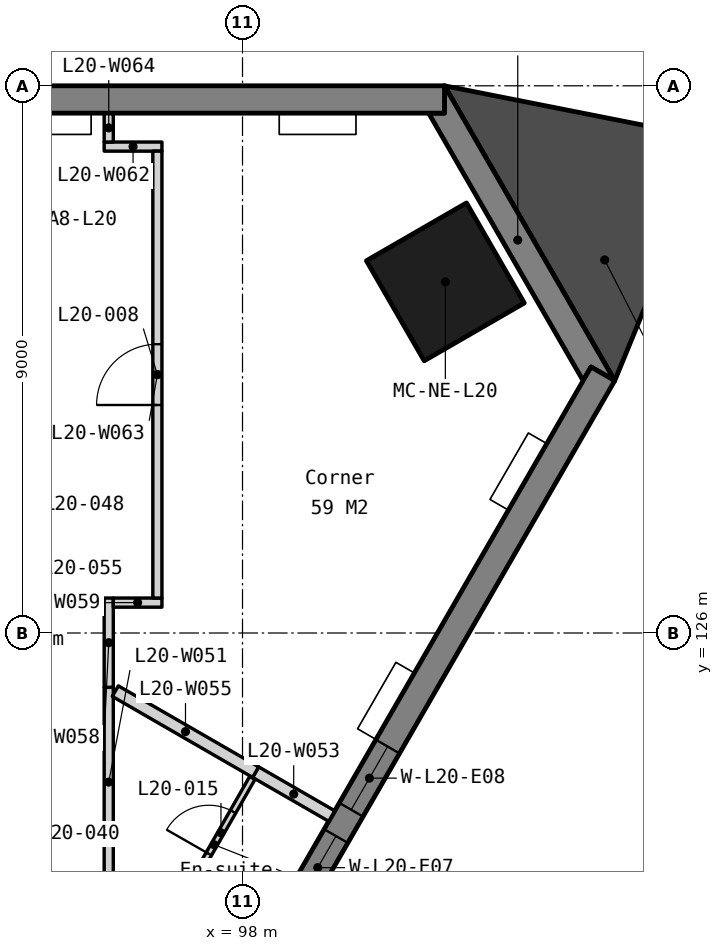
"""IFC4 building model, lengths in metres.
Left out: names, types, materials, properties, quantities, classifications, styles, units other than length and angle.
Written with IfcOpenShell. Run it as: python <this file> out.ifc"""

import sys

from ifc_helpers import new_model, si_unit, direction, frame, frame_2d, origin, origin_2d, place, context, subcontext, project, spatial, polyline, rectangle, outline, extrude, element, fill, save


model = new_model("IFC4")
c1 = context("Model", 3, precision=1e-05, world=origin(), true_north=direction((0.0, 1.0)))
c2 = subcontext(c1, "Body", "Model", "MODEL_VIEW")
j1 = project(units=[si_unit("LENGTHUNIT", "METRE"), si_unit("PLANEANGLEUNIT", "RADIAN")], contexts=[c1])
p1 = place(None, origin())
s1 = spatial("IfcSite", under=j1, at=p1, CompositionType="ELEMENT")
p2 = place(p1, origin())
s2 = spatial("IfcBuilding", under=s1, at=p2, CompositionType="ELEMENT")
p3 = place(p2, frame((0.0, 0.0, 85.3)))
s3 = spatial("IfcBuildingStorey", under=s2, at=p3, CompositionType="ELEMENT", Elevation=85.3)
p4 = place(p3, frame((101.336, 131.775, 0.0), z_axis=(0.0, 0.0, 1.0), x_axis=(-0.5, 0.866025403784, 0.0)))
e1 = element("IfcColumn", 1, at=p4, inside=s3, PredefinedType="COLUMN", context=c2, shape_type="SweptSolid", body=[
    extrude(rectangle(XDim=1.9, YDim=1.9, at=origin_2d()), origin(), (0.0, 0.0, 1.0), 3.5),
])
p5 = place(p3, frame((0.0, 0.0, -0.15)))
e2 = element("IfcWall", 2, at=p5, inside=s3, PredefinedType="SOLIDWALL", context=c2, shape_type="SweptSolid", body=[
    extrude(outline(polyline([(104.122, 130.15), (103.732, 130.375), (103.602, 130.15), (101.062, 134.55), (101.322, 134.55), (101.322, 135.0), (104.122, 130.15)])), origin(), (0.0, 0.0, 1.0), 3.5),
])
p6 = place(p3, frame((101.322, 134.775, -0.15), z_axis=(0.0, 0.0, 1.0), x_axis=(-1.0, 0.0, 0.0)))
e3 = element("IfcWall", 3, at=p6, inside=s3, PredefinedType="SOLIDWALL", context=c2, shape_type="SweptSolid", body=[
    extrude(outline(polyline([(42.643, 0.0), (42.643, 3.5), (0.0, 3.5), (0.0, 0.0), (42.643, 0.0)])), frame((0.0, 0.225, 0.0), z_axis=(0.0, -1.0, 0.0), x_axis=(1.0, 0.0, 0.0)), (0.0, 0.0, 1.0), 0.45),
])
p7 = place(p6, frame((7.079, 0.0, 1.05)))
e4 = element("IfcOpeningElement", 4, at=p7, cuts=e3, PredefinedType="OPENING", context=c2, shape_type="SweptSolid", body=[
    extrude(rectangle(XDim=1.2, YDim=1.5, at=frame_2d((0.6, 0.75))), frame((0.0, 0.235, 0.0), z_axis=(0.0, -1.0, 0.0), x_axis=(1.0, 0.0, 0.0)), (0.0, 0.0, 1.0), 0.47),
])
p8 = place(p6, frame((8.779, 0.0, 1.05)))
e5 = element("IfcOpeningElement", 5, at=p8, cuts=e3, PredefinedType="OPENING", context=c2, shape_type="SweptSolid", body=[
    extrude(rectangle(XDim=1.2, YDim=1.5, at=frame_2d((0.6, 0.75))), frame((0.0, 0.235, 0.0), z_axis=(0.0, -1.0, 0.0), x_axis=(1.0, 0.0, 0.0)), (0.0, 0.0, 1.0), 0.47),
])
p9 = place(p6, frame((15.607, 0.0, 1.05)))
e6 = element("IfcOpeningElement", 6, at=p9, cuts=e3, PredefinedType="OPENING", context=c2, shape_type="SweptSolid", body=[
    extrude(rectangle(XDim=1.2, YDim=1.5, at=frame_2d((0.6, 0.75))), frame((0.0, 0.235, 0.0), z_axis=(0.0, -1.0, 0.0), x_axis=(1.0, 0.0, 0.0)), (0.0, 0.0, 1.0), 0.47),
])
p10 = place(p6, frame((17.307, 0.0, 1.05)))
e7 = element("IfcOpeningElement", 7, at=p10, cuts=e3, PredefinedType="OPENING", context=c2, shape_type="SweptSolid", body=[
    extrude(rectangle(XDim=1.2, YDim=1.5, at=frame_2d((0.6, 0.75))), frame((0.0, 0.235, 0.0), z_axis=(0.0, -1.0, 0.0), x_axis=(1.0, 0.0, 0.0)), (0.0, 0.0, 1.0), 0.47),
])
p11 = place(p6, frame((24.136, 0.0, 1.05)))
e8 = element("IfcOpeningElement", 8, at=p11, cuts=e3, PredefinedType="OPENING", context=c2, shape_type="SweptSolid", body=[
    extrude(rectangle(XDim=1.2, YDim=1.5, at=frame_2d((0.6, 0.75))), frame((0.0, 0.235, 0.0), z_axis=(0.0, -1.0, 0.0), x_axis=(1.0, 0.0, 0.0)), (0.0, 0.0, 1.0), 0.47),
])
p12 = place(p6, frame((25.836, 0.0, 1.05)))
e9 = element("IfcOpeningElement", 9, at=p12, cuts=e3, PredefinedType="OPENING", context=c2, shape_type="SweptSolid", body=[
    extrude(rectangle(XDim=1.2, YDim=1.5, at=frame_2d((0.6, 0.75))), frame((0.0, 0.235, 0.0), z_axis=(0.0, -1.0, 0.0), x_axis=(1.0, 0.0, 0.0)), (0.0, 0.0, 1.0), 0.47),
])
p13 = place(p6, frame((32.665, 0.0, 1.05)))
e10 = element("IfcOpeningElement", 10, at=p13, cuts=e3, PredefinedType="OPENING", context=c2, shape_type="SweptSolid", body=[
    extrude(rectangle(XDim=1.2, YDim=1.5, at=frame_2d((0.6, 0.75))), frame((0.0, 0.235, 0.0), z_axis=(0.0, -1.0, 0.0), x_axis=(1.0, 0.0, 0.0)), (0.0, 0.0, 1.0), 0.47),
])
p14 = place(p6, frame((34.365, 0.0, 1.05)))
e11 = element("IfcOpeningElement", 11, at=p14, cuts=e3, PredefinedType="OPENING", context=c2, shape_type="SweptSolid", body=[
    extrude(rectangle(XDim=1.2, YDim=1.5, at=frame_2d((0.6, 0.75))), frame((0.0, 0.235, 0.0), z_axis=(0.0, -1.0, 0.0), x_axis=(1.0, 0.0, 0.0)), (0.0, 0.0, 1.0), 0.47),
])
p15 = place(p3, frame((82.605, 93.333, -0.15), z_axis=(0.0, 0.0, 1.0), x_axis=(0.500000478905, 0.866025127289, 0.0)))
e12 = element("IfcWall", 12, at=p15, inside=s3, PredefinedType="SOLIDWALL", context=c2, shape_type="SweptSolid", body=[
    extrude(outline(polyline([(42.643, 0.0), (42.643, 3.5), (0.0, 3.5), (0.0, 0.0), (42.643, 0.0)])), frame((0.0, 0.225, 0.0), z_axis=(0.0, -1.0, 0.0), x_axis=(1.0, 0.0, 0.0)), (0.0, 0.0, 1.0), 0.45),
])
p16 = place(p15, frame((7.079, 0.0, 1.05)))
e13 = element("IfcOpeningElement", 13, at=p16, cuts=e12, PredefinedType="OPENING", context=c2, shape_type="SweptSolid", body=[
    extrude(rectangle(XDim=1.2, YDim=1.5, at=frame_2d((0.6, 0.75))), frame((0.0, 0.235, 0.0), z_axis=(0.0, -1.0, 0.0), x_axis=(1.0, 0.0, 0.0)), (0.0, 0.0, 1.0), 0.47),
])
p17 = place(p15, frame((8.779, 0.0, 1.05)))
e14 = element("IfcOpeningElement", 14, at=p17, cuts=e12, PredefinedType="OPENING", context=c2, shape_type="SweptSolid", body=[
    extrude(rectangle(XDim=1.2, YDim=1.5, at=frame_2d((0.6, 0.75))), frame((0.0, 0.235, 0.0), z_axis=(0.0, -1.0, 0.0), x_axis=(1.0, 0.0, 0.0)), (0.0, 0.0, 1.0), 0.47),
])
p18 = place(p15, frame((15.607, 0.0, 1.05)))
e15 = element("IfcOpeningElement", 15, at=p18, cuts=e12, PredefinedType="OPENING", context=c2, shape_type="SweptSolid", body=[
    extrude(rectangle(XDim=1.2, YDim=1.5, at=frame_2d((0.6, 0.75))), frame((0.0, 0.235, 0.0), z_axis=(0.0, -1.0, 0.0), x_axis=(1.0, 0.0, 0.0)), (0.0, 0.0, 1.0), 0.47),
])
p19 = place(p15, frame((17.307, 0.0, 1.05)))
e16 = element("IfcOpeningElement", 16, at=p19, cuts=e12, PredefinedType="OPENING", context=c2, shape_type="SweptSolid", body=[
    extrude(rectangle(XDim=1.2, YDim=1.5, at=frame_2d((0.6, 0.75))), frame((0.0, 0.235, 0.0), z_axis=(0.0, -1.0, 0.0), x_axis=(1.0, 0.0, 0.0)), (0.0, 0.0, 1.0), 0.47),
])
p20 = place(p15, frame((24.136, 0.0, 1.05)))
e17 = element("IfcOpeningElement", 17, at=p20, cuts=e12, PredefinedType="OPENING", context=c2, shape_type="SweptSolid", body=[
    extrude(rectangle(XDim=1.2, YDim=1.5, at=frame_2d((0.6, 0.75))), frame((0.0, 0.235, 0.0), z_axis=(0.0, -1.0, 0.0), x_axis=(1.0, 0.0, 0.0)), (0.0, 0.0, 1.0), 0.47),
])
p21 = place(p15, frame((25.836, 0.0, 1.05)))
e18 = element("IfcOpeningElement", 18, at=p21, cuts=e12, PredefinedType="OPENING", context=c2, shape_type="SweptSolid", body=[
    extrude(rectangle(XDim=1.2, YDim=1.5, at=frame_2d((0.6, 0.75))), frame((0.0, 0.235, 0.0), z_axis=(0.0, -1.0, 0.0), x_axis=(1.0, 0.0, 0.0)), (0.0, 0.0, 1.0), 0.47),
])
p22 = place(p15, frame((32.665, 0.0, 1.05)))
e19 = element("IfcOpeningElement", 19, at=p22, cuts=e12, PredefinedType="OPENING", context=c2, shape_type="SweptSolid", body=[
    extrude(rectangle(XDim=1.2, YDim=1.5, at=frame_2d((0.6, 0.75))), frame((0.0, 0.235, 0.0), z_axis=(0.0, -1.0, 0.0), x_axis=(1.0, 0.0, 0.0)), (0.0, 0.0, 1.0), 0.47),
])
p23 = place(p15, frame((34.365, 0.0, 1.05)))
e20 = element("IfcOpeningElement", 20, at=p23, cuts=e12, PredefinedType="OPENING", context=c2, shape_type="SweptSolid", body=[
    extrude(rectangle(XDim=1.2, YDim=1.5, at=frame_2d((0.6, 0.75))), frame((0.0, 0.235, 0.0), z_axis=(0.0, -1.0, 0.0), x_axis=(1.0, 0.0, 0.0)), (0.0, 0.0, 1.0), 0.47),
])
p24 = place(p3, frame((0.0, 0.0, -0.15)))
e21 = element("IfcWall", 21, at=p24, inside=s3, PredefinedType="SOLIDWALL", context=c2, shape_type="SweptSolid", body=[
    extrude(outline(polyline([(104.122, 130.15), (105.752, 134.122), (101.322, 135.0), (104.122, 130.15)])), origin(), (0.0, 0.0, 1.0), 3.5),
])
p25 = place(p3, frame((95.8, 121.989, 0.0), z_axis=(0.0, 0.0, 1.0), x_axis=(0.0, 1.0, 0.0)))
e22 = element("IfcWall", 22, at=p25, inside=s3, PredefinedType="PARTITIONING", context=c2, shape_type="SweptSolid", body=[
    extrude(rectangle(XDim=3.118, YDim=0.15, at=frame_2d((1.559, 0.0))), origin(), (0.0, 0.0, 1.0), 3.35),
])
p26 = place(p3, frame((98.216, 123.712, 0.0), z_axis=(0.0, 0.0, 1.0), x_axis=(0.866019559589, -0.500010122307, 0.0)))
e23 = element("IfcWall", 23, at=p26, inside=s3, PredefinedType="PARTITIONING", context=c2, shape_type="SweptSolid", body=[
    extrude(rectangle(XDim=1.445, YDim=0.2, at=frame_2d((0.722, 0.0))), origin(), (0.0, 0.0, 1.0), 3.35),
])
p27 = place(p3, frame((96.905, 121.42, 0.0), z_axis=(0.0, 0.0, 1.0), x_axis=(0.496762324189, 0.867886624661, 0.0)))
e24 = element("IfcWall", 24, at=p27, inside=s3, PredefinedType="PARTITIONING", context=c2, shape_type="SweptSolid", body=[
    extrude(rectangle(XDim=2.53, YDim=0.1, at=frame_2d((1.265, 0.0))), origin(), (0.0, 0.0, 1.0), 3.35),
])
p28 = place(p27, frame((1.091, 0.0, 0.0)))
e25 = element("IfcOpeningElement", 25, at=p28, cuts=e24, PredefinedType="OPENING", context=c2, shape_type="SweptSolid", body=[
    extrude(rectangle(XDim=0.8, YDim=2.1, at=frame_2d((0.4, 1.05))), frame((0.0, 0.06, 0.0), z_axis=(0.0, -1.0, 0.0), x_axis=(1.0, 0.0, 0.0)), (0.0, 0.0, 1.0), 0.12),
])
p29 = place(p3, frame((95.908, 125.044, 0.0), z_axis=(0.0, 0.0, 1.0), x_axis=(0.866036091453, -0.499981487958, 0.0)))
e26 = element("IfcWall", 26, at=p29, inside=s3, PredefinedType="PARTITIONING", context=c2, shape_type="SweptSolid", body=[
    extrude(rectangle(XDim=2.665, YDim=0.2, at=frame_2d((1.333, 0.0))), origin(), (0.0, 0.0, 1.0), 3.35),
])
p30 = place(p3, frame((95.8, 125.107, 0.0), z_axis=(0.0, 0.0, 1.0), x_axis=(0.0, 1.0, 0.0)))
e27 = element("IfcWall", 27, at=p30, inside=s3, PredefinedType="PARTITIONING", context=c2, shape_type="SweptSolid", body=[
    extrude(rectangle(XDim=1.468, YDim=0.15, at=frame_2d((0.734, 0.0))), origin(), (0.0, 0.0, 1.0), 3.35),
])
p31 = place(p3, frame((95.875, 126.5, 0.0), z_axis=(0.0, 0.0, 1.0), x_axis=(1.0, 0.0, 0.0)))
e28 = element("IfcWall", 28, at=p31, inside=s3, PredefinedType="PARTITIONING", context=c2, shape_type="SweptSolid", body=[
    extrude(rectangle(XDim=0.8, YDim=0.15, at=frame_2d((0.4, 0.0))), origin(), (0.0, 0.0, 1.0), 3.35),
])
p32 = place(p3, frame((95.725, 134.0, 0.0), z_axis=(0.0, 0.0, 1.0), x_axis=(1.0, 0.0, 0.0)))
e29 = element("IfcWall", 29, at=p32, inside=s3, PredefinedType="PARTITIONING", context=c2, shape_type="SweptSolid", body=[
    extrude(rectangle(XDim=0.95, YDim=0.15, at=frame_2d((0.475, 0.0))), origin(), (0.0, 0.0, 1.0), 2.886),
])
p33 = place(p3, frame((96.6, 126.575, 0.0), z_axis=(0.0, 0.0, 1.0), x_axis=(0.0, 1.0, 0.0)))
e30 = element("IfcWall", 30, at=p33, inside=s3, PredefinedType="PARTITIONING", context=c2, shape_type="SweptSolid", body=[
    extrude(rectangle(XDim=7.35, YDim=0.15, at=frame_2d((3.675, 0.0))), origin(), (0.0, 0.0, 1.0), 3.35),
])
p34 = place(p33, frame((3.175, 0.0, 0.0)))
e31 = element("IfcOpeningElement", 31, at=p34, cuts=e30, PredefinedType="OPENING", context=c2, shape_type="SweptSolid", body=[
    extrude(rectangle(XDim=1.0, YDim=2.1, at=frame_2d((0.5, 1.05))), frame((0.0, 0.085, 0.0), z_axis=(0.0, -1.0, 0.0), x_axis=(1.0, 0.0, 0.0)), (0.0, 0.0, 1.0), 0.17),
])
p35 = place(p3, frame((95.8, 134.075, 0.0), z_axis=(0.0, 0.0, 1.0), x_axis=(0.0, 1.0, 0.0)))
e32 = element("IfcWall", 32, at=p35, inside=s3, PredefinedType="PARTITIONING", context=c2, shape_type="SweptSolid", body=[
    extrude(rectangle(XDim=0.465, YDim=0.15, at=frame_2d((0.232, 0.0))), origin(), (0.0, 0.0, 1.0), 3.35),
])
p36 = place(p22, origin())
e33 = element("IfcWindow", 33, at=p36, inside=s3, PartitioningType="SINGLE_PANEL", PredefinedType="WINDOW", context=c2, shape_type="SweptSolid", body=[
    extrude(rectangle(XDim=1.2, YDim=1.5, at=frame_2d((0.6, 0.75))), frame((0.0, 0.03, 0.0), z_axis=(0.0, -1.0, 0.0), x_axis=(1.0, 0.0, 0.0)), (0.0, 0.0, 1.0), 0.06),
])
fill(e19, e33)
p37 = place(p23, origin())
e34 = element("IfcWindow", 34, at=p37, inside=s3, PartitioningType="SINGLE_PANEL", PredefinedType="WINDOW", context=c2, shape_type="SweptSolid", body=[
    extrude(rectangle(XDim=1.2, YDim=1.5, at=frame_2d((0.6, 0.75))), frame((0.0, 0.03, 0.0), z_axis=(0.0, -1.0, 0.0), x_axis=(1.0, 0.0, 0.0)), (0.0, 0.0, 1.0), 0.06),
])
fill(e20, e34)
p38 = place(p34, origin())
e35 = element("IfcDoor", 35, at=p38, inside=s3, OperationType="SINGLE_SWING_LEFT", PredefinedType="DOOR", context=c2, shape_type="SweptSolid", body=[
    extrude(rectangle(XDim=1.0, YDim=2.1, at=frame_2d((0.5, 1.05))), frame((0.0, 0.025, 0.0), z_axis=(0.0, -1.0, 0.0), x_axis=(1.0, 0.0, 0.0)), (0.0, 0.0, 1.0), 0.05),
])
fill(e31, e35)
p39 = place(p28, origin())
e36 = element("IfcDoor", 36, at=p39, inside=s3, OperationType="SINGLE_SWING_LEFT", PredefinedType="DOOR", context=c2, shape_type="SweptSolid", body=[
    extrude(rectangle(XDim=0.8, YDim=2.1, at=frame_2d((0.4, 1.05))), frame((0.0, 0.025, 0.0), z_axis=(0.0, -1.0, 0.0), x_axis=(1.0, 0.0, 0.0)), (0.0, 0.0, 1.0), 0.05),
])
fill(e25, e36)
save(model, sys.argv[1])
